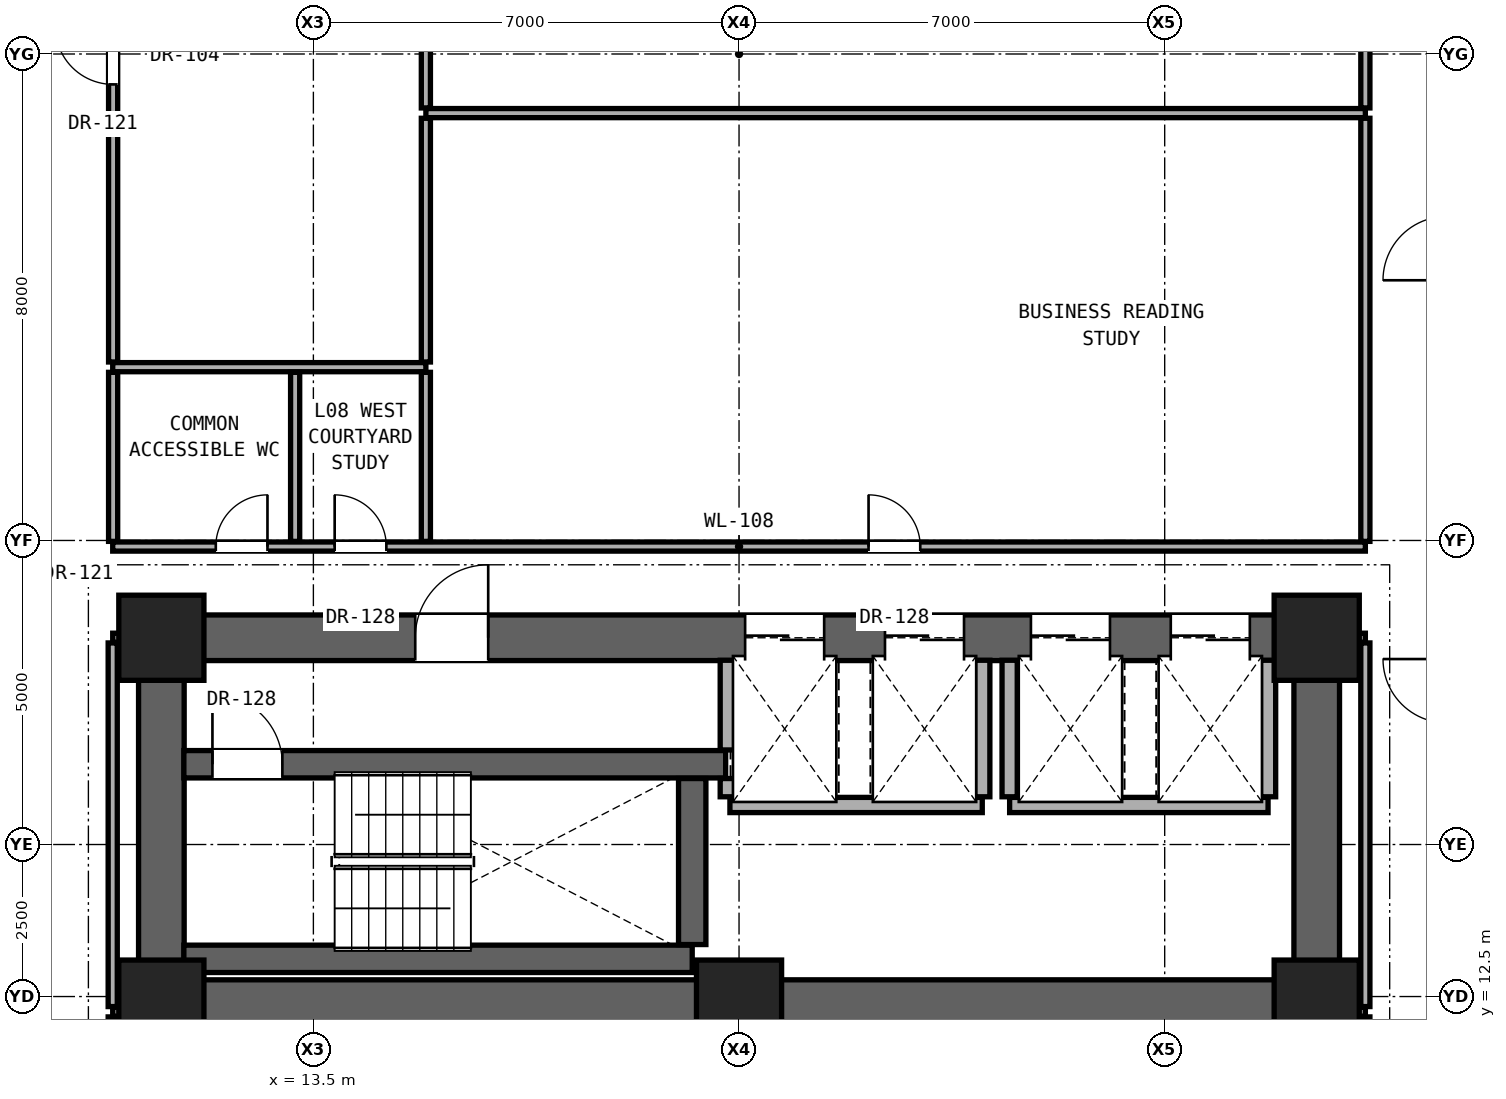
"""IFC4 building model, lengths in metres.
Left out: names, types, materials, properties, quantities, classifications, styles, units other than length and angle.
Written with IfcOpenShell. Run it as: python <this file> out.ifc"""

import sys

from ifc_helpers import new_model, si_unit, direction, frame, frame_2d, origin, origin_2d, place, context, subcontext, project, spatial, rectangle, extrude, element, fill, save


model = new_model("IFC4")
c1 = context("Model", 3, precision=1e-05, world=origin(), true_north=direction((0.0, 1.0)))
c2 = subcontext(c1, "Body", "Model", "MODEL_VIEW")
j1 = project(units=[si_unit("LENGTHUNIT", "METRE"), si_unit("PLANEANGLEUNIT", "RADIAN")], contexts=[c1])
p1 = place(None, origin())
s1 = spatial("IfcSite", under=j1, at=p1, CompositionType="ELEMENT")
p2 = place(p1, origin())
s2 = spatial("IfcBuilding", under=s1, at=p2, CompositionType="ELEMENT")
p3 = place(p2, frame((0.0, 0.0, 32.3)))
s3 = spatial("IfcBuildingStorey", under=s2, at=p3, CompositionType="ELEMENT", Elevation=32.3)
for number, where, z_axis, x_axis in (
    (1, (11.0, 12.4, 0.0), (0.0, 0.0, 1.0), (1.0, 0.0, 0.0)),
    (2, (20.5, 12.4, 0.0), (0.0, 0.0, 1.0), (1.0, 0.0, 0.0)),
    (3, (30.0, 12.4, 0.0), (0.0, 0.0, 1.0), (1.0, 0.0, 0.0)),
    (4, (11.0, 18.4, 0.0), (0.0, 0.0, 1.0), (1.0, 0.0, 0.0)),
    (5, (30.0, 18.4, 0.0), (0.0, 0.0, 1.0), (1.0, 0.0, 0.0)),
):
    element("IfcColumn", number, at=place(p3, frame(where, z_axis=z_axis, x_axis=x_axis)), inside=s3, PredefinedType="COLUMN", context=c2, shape_type="SweptSolid", body=[
        extrude(rectangle(XDim=1.4, YDim=1.4, at=origin_2d()), origin(), (0.0, 0.0, 1.0), 3.3),
    ])
p4 = place(p3, frame((11.0, 12.4, 0.0), z_axis=(0.0, 0.0, 1.0), x_axis=(1.0, 0.0, 0.0)))
e6 = element("IfcWall", 6, at=p4, inside=s3, PredefinedType="SHEAR", context=c2, shape_type="SweptSolid", body=[
    extrude(rectangle(XDim=19.0, YDim=0.75, at=frame_2d((9.5, 0.0))), origin(), (0.0, 0.0, 1.0), 3.06),
])
for number, where, z_axis, x_axis in (
    (7, (11.0, 12.4, 0.0), (0.0, 0.0, 1.0), (0.0, 1.0, 0.0)),
    (8, (30.0, 12.4, 0.0), (0.0, 0.0, 1.0), (0.0, 1.0, 0.0)),
):
    element("IfcWall", number, at=place(p3, frame(where, z_axis=z_axis, x_axis=x_axis)), inside=s3, PredefinedType="SHEAR", context=c2, shape_type="SweptSolid", body=[
        extrude(rectangle(XDim=6.0, YDim=0.75, at=frame_2d((3.0, 0.0))), origin(), (0.0, 0.0, 1.0), 3.06),
    ])
p5 = place(p3, frame((11.0, 18.4, 0.0), z_axis=(0.0, 0.0, 1.0), x_axis=(1.0, 0.0, 0.0)))
e9 = element("IfcWall", 9, at=p5, inside=s3, PredefinedType="SHEAR", context=c2, shape_type="SweptSolid", body=[
    extrude(rectangle(XDim=19.0, YDim=0.75, at=frame_2d((9.5, 0.0))), origin(), (0.0, 0.0, 1.0), 3.06),
])
p6 = place(p5, frame((4.175, 0.0, 0.0)))
e10 = element("IfcOpeningElement", 10, at=p6, cuts=e9, PredefinedType="OPENING", context=c2, shape_type="SweptSolid", body=[
    extrude(rectangle(XDim=1.2, YDim=2.25, at=frame_2d((0.6, 1.125))), frame((0.0, 0.385, 0.0), z_axis=(0.0, -1.0, 0.0), x_axis=(1.0, 0.0, 0.0)), (0.0, 0.0, 1.0), 0.77),
])
p7 = place(p5, frame((9.6, 0.0, 0.0)))
e11 = element("IfcOpeningElement", 11, at=p7, cuts=e9, PredefinedType="OPENING", context=c2, shape_type="SweptSolid", body=[
    extrude(rectangle(XDim=1.3, YDim=2.3, at=frame_2d((0.65, 1.15))), frame((0.0, 0.385, 0.0), z_axis=(0.0, -1.0, 0.0), x_axis=(1.0, 0.0, 0.0)), (0.0, 0.0, 1.0), 0.77),
])
p8 = place(p5, frame((11.9, 0.0, 0.0)))
e12 = element("IfcOpeningElement", 12, at=p8, cuts=e9, PredefinedType="OPENING", context=c2, shape_type="SweptSolid", body=[
    extrude(rectangle(XDim=1.3, YDim=2.3, at=frame_2d((0.65, 1.15))), frame((0.0, 0.385, 0.0), z_axis=(0.0, -1.0, 0.0), x_axis=(1.0, 0.0, 0.0)), (0.0, 0.0, 1.0), 0.77),
])
p9 = place(p5, frame((14.3, 0.0, 0.0)))
e13 = element("IfcOpeningElement", 13, at=p9, cuts=e9, PredefinedType="OPENING", context=c2, shape_type="SweptSolid", body=[
    extrude(rectangle(XDim=1.3, YDim=2.3, at=frame_2d((0.65, 1.15))), frame((0.0, 0.385, 0.0), z_axis=(0.0, -1.0, 0.0), x_axis=(1.0, 0.0, 0.0)), (0.0, 0.0, 1.0), 0.77),
])
p10 = place(p5, frame((16.6, 0.0, 0.0)))
e14 = element("IfcOpeningElement", 14, at=p10, cuts=e9, PredefinedType="OPENING", context=c2, shape_type="SweptSolid", body=[
    extrude(rectangle(XDim=1.3, YDim=2.3, at=frame_2d((0.65, 1.15))), frame((0.0, 0.385, 0.0), z_axis=(0.0, -1.0, 0.0), x_axis=(1.0, 0.0, 0.0)), (0.0, 0.0, 1.0), 0.77),
])
for number, where, z_axis, x_axis in (
    (15, (10.2, 12.25, 0.0), (0.0, 0.0, 1.0), (1.0, 0.0, 0.0)),
    (16, (30.37, 12.25, 0.0), (0.0, 0.0, 1.0), (1.0, 0.0, 0.0)),
):
    element("IfcWall", number, at=place(p3, frame(where, z_axis=z_axis, x_axis=x_axis)), inside=s3, PredefinedType="PARTITIONING", context=c2, shape_type="SweptSolid", body=[
        extrude(rectangle(XDim=0.43, YDim=0.15, at=frame_2d((0.215, 0.0))), origin(), (0.0, 0.0, 1.0), 3.06),
    ])
p11 = place(p3, frame((11.37, 13.12, 0.0), z_axis=(0.0, 0.0, 1.0), x_axis=(1.0, 0.0, 0.0)))
e17 = element("IfcWall", 17, at=p11, inside=s3, PredefinedType="SHEAR", context=c2, shape_type="SweptSolid", body=[
    extrude(rectangle(XDim=8.36, YDim=0.45, at=frame_2d((4.18, 0.0))), origin(), (0.0, 0.0, 1.0), 3.06),
])
p12 = place(p3, frame((20.35, 15.65, 0.0), z_axis=(0.0, 0.0, 1.0), x_axis=(1.0, 0.0, 0.0)))
e18 = element("IfcWall", 18, at=p12, inside=s3, PredefinedType="SOLIDWALL", context=c2, shape_type="SweptSolid", body=[
    extrude(rectangle(XDim=4.15, YDim=0.25, at=frame_2d((2.075, 0.0))), origin(), (0.0, 0.0, 1.0), 3.06),
])
p13 = place(p3, frame((24.95, 15.65, 0.0), z_axis=(0.0, 0.0, 1.0), x_axis=(1.0, 0.0, 0.0)))
e19 = element("IfcWall", 19, at=p13, inside=s3, PredefinedType="SOLIDWALL", context=c2, shape_type="SweptSolid", body=[
    extrude(rectangle(XDim=4.25, YDim=0.25, at=frame_2d((2.125, 0.0))), origin(), (0.0, 0.0, 1.0), 3.06),
])
p14 = place(p3, frame((11.37, 16.32, 0.0), z_axis=(0.0, 0.0, 1.0), x_axis=(1.0, 0.0, 0.0)))
e20 = element("IfcWall", 20, at=p14, inside=s3, PredefinedType="SHEAR", context=c2, shape_type="SweptSolid", body=[
    extrude(rectangle(XDim=8.91, YDim=0.45, at=frame_2d((4.455, 0.0))), origin(), (0.0, 0.0, 1.0), 3.06),
])
p15 = place(p14, frame((0.47, 0.0, 0.0)))
e21 = element("IfcOpeningElement", 21, at=p15, cuts=e20, PredefinedType="OPENING", context=c2, shape_type="SweptSolid", body=[
    extrude(rectangle(XDim=1.15, YDim=2.2, at=frame_2d((0.575, 1.1))), frame((0.0, 0.235, 0.0), z_axis=(0.0, -1.0, 0.0), x_axis=(1.0, 0.0, 0.0)), (0.0, 0.0, 1.0), 0.47),
])
for number, where, z_axis, x_axis in (
    (22, (10.2, 18.4, 0.0), (0.0, 0.0, 1.0), (1.0, 0.0, 0.0)),
    (23, (30.37, 18.4, 0.0), (0.0, 0.0, 1.0), (1.0, 0.0, 0.0)),
):
    element("IfcWall", number, at=place(p3, frame(where, z_axis=z_axis, x_axis=x_axis)), inside=s3, PredefinedType="PARTITIONING", context=c2, shape_type="SweptSolid", body=[
        extrude(rectangle(XDim=0.43, YDim=0.15, at=frame_2d((0.215, 0.0))), origin(), (0.0, 0.0, 1.0), 2.436),
    ])
p16 = place(p3, frame((10.2, 19.9, 0.0), z_axis=(0.0, 0.0, 1.0), x_axis=(1.0, 0.0, 0.0)))
e24 = element("IfcWall", 24, at=p16, inside=s3, PredefinedType="PARTITIONING", context=c2, shape_type="SweptSolid", body=[
    extrude(rectangle(XDim=20.6, YDim=0.15, at=frame_2d((10.3, 0.0))), origin(), (0.0, 0.0, 1.0), 2.104),
])
p17 = place(p16, frame((1.695, 0.0, 0.0)))
e25 = element("IfcOpeningElement", 25, at=p17, cuts=e24, PredefinedType="OPENING", context=c2, shape_type="SweptSolid", body=[
    extrude(rectangle(XDim=0.85, YDim=2.01, at=frame_2d((0.425, 1.005))), frame((0.0, 0.085, 0.0), z_axis=(0.0, -1.0, 0.0), x_axis=(1.0, 0.0, 0.0)), (0.0, 0.0, 1.0), 0.17),
])
p18 = place(p16, frame((3.65, 0.0, 0.0)))
e26 = element("IfcOpeningElement", 26, at=p18, cuts=e24, PredefinedType="OPENING", context=c2, shape_type="SweptSolid", body=[
    extrude(rectangle(XDim=0.85, YDim=2.01, at=frame_2d((0.425, 1.005))), frame((0.0, 0.085, 0.0), z_axis=(0.0, -1.0, 0.0), x_axis=(1.0, 0.0, 0.0)), (0.0, 0.0, 1.0), 0.17),
])
p19 = place(p16, frame((12.43, 0.0, 0.0)))
e27 = element("IfcOpeningElement", 27, at=p19, cuts=e24, PredefinedType="OPENING", context=c2, shape_type="SweptSolid", body=[
    extrude(rectangle(XDim=0.85, YDim=2.01, at=frame_2d((0.425, 1.005))), frame((0.0, 0.085, 0.0), z_axis=(0.0, -1.0, 0.0), x_axis=(1.0, 0.0, 0.0)), (0.0, 0.0, 1.0), 0.17),
])
p20 = place(p3, frame((10.2, 22.85, 0.0), z_axis=(0.0, 0.0, 1.0), x_axis=(1.0, 0.0, 0.0)))
e28 = element("IfcWall", 28, at=p20, inside=s3, PredefinedType="PARTITIONING", context=c2, shape_type="SweptSolid", body=[
    extrude(rectangle(XDim=5.15, YDim=0.15, at=frame_2d((2.575, 0.0))), origin(), (0.0, 0.0, 1.0), 2.104),
])
p21 = place(p3, frame((15.35, 27.028, 0.0), z_axis=(0.0, 0.0, 1.0), x_axis=(1.0, 0.0, 0.0)))
e29 = element("IfcWall", 29, at=p21, inside=s3, PredefinedType="PARTITIONING", context=c2, shape_type="SweptSolid", body=[
    extrude(rectangle(XDim=15.45, YDim=0.15, at=frame_2d((7.725, 0.0))), origin(), (0.0, 0.0, 1.0), 2.104),
])
p22 = place(p3, frame((10.2, 8.726, 0.0), z_axis=(0.0, 0.0, 1.0), x_axis=(0.0, 1.0, 0.0)))
e30 = element("IfcWall", 30, at=p22, inside=s3, PredefinedType="PARTITIONING", context=c2, shape_type="SweptSolid", body=[
    extrude(rectangle(XDim=3.439, YDim=0.15, at=frame_2d((1.719, 0.0))), origin(), (0.0, 0.0, 1.0), 3.06),
])
p23 = place(p22, frame((1.195, 0.0, 0.0)))
e31 = element("IfcOpeningElement", 31, at=p23, cuts=e30, PredefinedType="OPENING", context=c2, shape_type="SweptSolid", body=[
    extrude(rectangle(XDim=1.05, YDim=2.2, at=frame_2d((0.525, 1.1))), frame((0.0, 0.085, 0.0), z_axis=(0.0, -1.0, 0.0), x_axis=(1.0, 0.0, 0.0)), (0.0, 0.0, 1.0), 0.17),
])
p24 = place(p3, frame((10.2, 12.335, 0.0), z_axis=(0.0, 0.0, 1.0), x_axis=(0.0, 1.0, 0.0)))
e32 = element("IfcWall", 32, at=p24, inside=s3, PredefinedType="PARTITIONING", context=c2, shape_type="SweptSolid", body=[
    extrude(rectangle(XDim=5.98, YDim=0.15, at=frame_2d((2.99, 0.0))), origin(), (0.0, 0.0, 1.0), 2.436),
])
p25 = place(p3, frame((10.207, 19.985, 0.0), z_axis=(0.0, 0.0, 1.0), x_axis=(0.0, 1.0, 0.0)))
e33 = element("IfcWall", 33, at=p25, inside=s3, PredefinedType="PARTITIONING", context=c2, shape_type="SweptSolid", body=[
    extrude(rectangle(XDim=2.78, YDim=0.15, at=frame_2d((1.39, 0.0))), origin(), (0.0, 0.0, 1.0), 3.06),
])
p26 = place(p3, frame((10.207, 22.935, 0.0), z_axis=(0.0, 0.0, 1.0), x_axis=(0.0, 1.0, 0.0)))
e34 = element("IfcWall", 34, at=p26, inside=s3, PredefinedType="PARTITIONING", context=c2, shape_type="SweptSolid", body=[
    extrude(rectangle(XDim=10.08, YDim=0.15, at=frame_2d((5.04, 0.0))), origin(), (0.0, 0.0, 1.0), 2.279),
])
p27 = place(p26, frame((4.565, 0.0, 0.0)))
e35 = element("IfcOpeningElement", 35, at=p27, cuts=e34, PredefinedType="OPENING", context=c2, shape_type="SweptSolid", body=[
    extrude(rectangle(XDim=0.95, YDim=2.15, at=frame_2d((0.475, 1.075))), frame((0.0, 0.085, 0.0), z_axis=(0.0, -1.0, 0.0), x_axis=(1.0, 0.0, 0.0)), (0.0, 0.0, 1.0), 0.17),
])
for number, where, z_axis, x_axis in (
    (36, (13.2, 19.985, 0.0), (0.0, 0.0, 1.0), (0.0, 1.0, 0.0)),
    (37, (15.35, 19.985, 0.0), (0.0, 0.0, 1.0), (0.0, 1.0, 0.0)),
):
    element("IfcWall", number, at=place(p3, frame(where, z_axis=z_axis, x_axis=x_axis)), inside=s3, PredefinedType="PARTITIONING", context=c2, shape_type="SweptSolid", body=[
        extrude(rectangle(XDim=2.78, YDim=0.15, at=frame_2d((1.39, 0.0))), origin(), (0.0, 0.0, 1.0), 3.06),
    ])
p28 = place(p3, frame((15.35, 22.935, 0.0), z_axis=(0.0, 0.0, 1.0), x_axis=(0.0, 1.0, 0.0)))
e38 = element("IfcWall", 38, at=p28, inside=s3, PredefinedType="PARTITIONING", context=c2, shape_type="SweptSolid", body=[
    extrude(rectangle(XDim=4.008, YDim=0.15, at=frame_2d((2.004, 0.0))), origin(), (0.0, 0.0, 1.0), 2.104),
])
p29 = place(p3, frame((15.35, 27.113, 0.0), z_axis=(0.0, 0.0, 1.0), x_axis=(0.0, 1.0, 0.0)))
e39 = element("IfcWall", 39, at=p29, inside=s3, PredefinedType="PARTITIONING", context=c2, shape_type="SweptSolid", body=[
    extrude(rectangle(XDim=5.902, YDim=0.15, at=frame_2d((2.951, 0.0))), origin(), (0.0, 0.0, 1.0), 2.104),
])
p30 = place(p3, frame((19.73, 13.355, 0.0), z_axis=(0.0, 0.0, 1.0), x_axis=(0.0, 1.0, 0.0)))
e40 = element("IfcWall", 40, at=p30, inside=s3, PredefinedType="SHEAR", context=c2, shape_type="SweptSolid", body=[
    extrude(rectangle(XDim=2.73, YDim=0.45, at=frame_2d((1.365, 0.0))), origin(), (0.0, 0.0, 1.0), 3.06),
])
p31 = place(p3, frame((20.315, 15.785, 0.0), z_axis=(0.0, 0.0, 1.0), x_axis=(0.0, 1.0, 0.0)))
e41 = element("IfcWall", 41, at=p31, inside=s3, PredefinedType="SOLIDWALL", context=c2, shape_type="SweptSolid", body=[
    extrude(rectangle(XDim=0.3, YDim=0.25, at=frame_2d((0.15, 0.0))), origin(), (0.0, 0.0, 1.0), 3.06),
])
p32 = place(p3, frame((20.315, 16.555, 0.0), z_axis=(0.0, 0.0, 1.0), x_axis=(0.0, 1.0, 0.0)))
e42 = element("IfcWall", 42, at=p32, inside=s3, PredefinedType="SOLIDWALL", context=c2, shape_type="SweptSolid", body=[
    extrude(rectangle(XDim=1.475, YDim=0.25, at=frame_2d((0.738, 0.0))), origin(), (0.0, 0.0, 1.0), 3.06),
])
for number, where, z_axis, x_axis in (
    (43, (24.5, 15.785, 0.0), (0.0, 0.0, 1.0), (0.0, 1.0, 0.0)),
    (44, (24.95, 15.785, 0.0), (0.0, 0.0, 1.0), (0.0, 1.0, 0.0)),
    (45, (29.2, 15.785, 0.0), (0.0, 0.0, 1.0), (0.0, 1.0, 0.0)),
):
    element("IfcWall", number, at=place(p3, frame(where, z_axis=z_axis, x_axis=x_axis)), inside=s3, PredefinedType="SOLIDWALL", context=c2, shape_type="SweptSolid", body=[
        extrude(rectangle(XDim=2.245, YDim=0.25, at=frame_2d((1.123, 0.0))), origin(), (0.0, 0.0, 1.0), 3.06),
    ])
p33 = place(p3, frame((30.8, 8.726, 0.0), z_axis=(0.0, 0.0, 1.0), x_axis=(0.0, 1.0, 0.0)))
e46 = element("IfcWall", 46, at=p33, inside=s3, PredefinedType="PARTITIONING", context=c2, shape_type="SweptSolid", body=[
    extrude(rectangle(XDim=3.439, YDim=0.15, at=frame_2d((1.719, 0.0))), origin(), (0.0, 0.0, 1.0), 3.06),
])
p34 = place(p33, frame((1.195, 0.0, 0.0)))
e47 = element("IfcOpeningElement", 47, at=p34, cuts=e46, PredefinedType="OPENING", context=c2, shape_type="SweptSolid", body=[
    extrude(rectangle(XDim=1.05, YDim=2.2, at=frame_2d((0.525, 1.1))), frame((0.0, 0.085, 0.0), z_axis=(0.0, -1.0, 0.0), x_axis=(1.0, 0.0, 0.0)), (0.0, 0.0, 1.0), 0.17),
])
p35 = place(p3, frame((30.8, 12.335, 0.0), z_axis=(0.0, 0.0, 1.0), x_axis=(0.0, 1.0, 0.0)))
e48 = element("IfcWall", 48, at=p35, inside=s3, PredefinedType="PARTITIONING", context=c2, shape_type="SweptSolid", body=[
    extrude(rectangle(XDim=5.98, YDim=0.15, at=frame_2d((2.99, 0.0))), origin(), (0.0, 0.0, 1.0), 2.436),
])
p36 = place(p3, frame((30.8, 19.985, 0.0), z_axis=(0.0, 0.0, 1.0), x_axis=(0.0, 1.0, 0.0)))
e49 = element("IfcWall", 49, at=p36, inside=s3, PredefinedType="PARTITIONING", context=c2, shape_type="SweptSolid", body=[
    extrude(rectangle(XDim=6.958, YDim=0.15, at=frame_2d((3.479, 0.0))), origin(), (0.0, 0.0, 1.0), 2.279),
])
p37 = place(p3, frame((30.8, 27.113, 0.0), z_axis=(0.0, 0.0, 1.0), x_axis=(0.0, 1.0, 0.0)))
e50 = element("IfcWall", 50, at=p37, inside=s3, PredefinedType="PARTITIONING", context=c2, shape_type="SweptSolid", body=[
    extrude(rectangle(XDim=5.902, YDim=0.15, at=frame_2d((2.951, 0.0))), origin(), (0.0, 0.0, 1.0), 2.279),
])
p38 = place(p6, origin())
e51 = element("IfcDoor", 51, at=p38, inside=s3, OperationType="SINGLE_SWING_RIGHT", PredefinedType="DOOR", context=c2, shape_type="SweptSolid", body=[
    extrude(rectangle(XDim=1.2, YDim=2.25, at=frame_2d((0.6, 1.125))), frame((0.0, 0.025, 0.0), z_axis=(0.0, -1.0, 0.0), x_axis=(1.0, 0.0, 0.0)), (0.0, 0.0, 1.0), 0.05),
])
fill(e10, e51)
p39 = place(p15, origin())
e52 = element("IfcDoor", 52, at=p39, inside=s3, OperationType="SINGLE_SWING_LEFT", PredefinedType="DOOR", context=c2, shape_type="SweptSolid", body=[
    extrude(rectangle(XDim=1.15, YDim=2.2, at=frame_2d((0.575, 1.1))), frame((0.0, 0.025, 0.0), z_axis=(0.0, -1.0, 0.0), x_axis=(1.0, 0.0, 0.0)), (0.0, 0.0, 1.0), 0.05),
])
fill(e21, e52)
p40 = place(p17, origin())
e53 = element("IfcDoor", 53, at=p40, inside=s3, OperationType="SINGLE_SWING_RIGHT", PredefinedType="DOOR", context=c2, shape_type="SweptSolid", body=[
    extrude(rectangle(XDim=0.85, YDim=2.01, at=frame_2d((0.425, 1.005))), frame((0.0, 0.025, 0.0), z_axis=(0.0, -1.0, 0.0), x_axis=(1.0, 0.0, 0.0)), (0.0, 0.0, 1.0), 0.05),
])
fill(e25, e53)
p41 = place(p18, origin())
e54 = element("IfcDoor", 54, at=p41, inside=s3, OperationType="SINGLE_SWING_LEFT", PredefinedType="DOOR", context=c2, shape_type="SweptSolid", body=[
    extrude(rectangle(XDim=0.85, YDim=2.01, at=frame_2d((0.425, 1.005))), frame((0.0, 0.025, 0.0), z_axis=(0.0, -1.0, 0.0), x_axis=(1.0, 0.0, 0.0)), (0.0, 0.0, 1.0), 0.05),
])
fill(e26, e54)
p42 = place(p27, origin())
e55 = element("IfcDoor", 55, at=p42, inside=s3, OperationType="SINGLE_SWING_RIGHT", PredefinedType="DOOR", context=c2, shape_type="SweptSolid", body=[
    extrude(rectangle(XDim=0.95, YDim=2.15, at=frame_2d((0.475, 1.075))), frame((0.0, 0.025, 0.0), z_axis=(0.0, -1.0, 0.0), x_axis=(1.0, 0.0, 0.0)), (0.0, 0.0, 1.0), 0.05),
])
fill(e35, e55)
p43 = place(p19, origin())
e56 = element("IfcDoor", 56, at=p43, inside=s3, OperationType="SINGLE_SWING_LEFT", PredefinedType="DOOR", context=c2, shape_type="SweptSolid", body=[
    extrude(rectangle(XDim=0.85, YDim=2.01, at=frame_2d((0.425, 1.005))), frame((0.0, 0.025, 0.0), z_axis=(0.0, -1.0, 0.0), x_axis=(1.0, 0.0, 0.0)), (0.0, 0.0, 1.0), 0.05),
])
fill(e27, e56)
p44 = place(p7, origin())
e57 = element("IfcDoor", 57, at=p44, inside=s3, OperationType="DOUBLE_DOOR_SLIDING", PredefinedType="DOOR", context=c2, shape_type="SweptSolid", body=[
    extrude(rectangle(XDim=1.3, YDim=2.3, at=frame_2d((0.65, 1.15))), frame((0.0, 0.025, 0.0), z_axis=(0.0, -1.0, 0.0), x_axis=(1.0, 0.0, 0.0)), (0.0, 0.0, 1.0), 0.05),
])
fill(e11, e57)
p45 = place(p8, origin())
e58 = element("IfcDoor", 58, at=p45, inside=s3, OperationType="DOUBLE_DOOR_SLIDING", PredefinedType="DOOR", context=c2, shape_type="SweptSolid", body=[
    extrude(rectangle(XDim=1.3, YDim=2.3, at=frame_2d((0.65, 1.15))), frame((0.0, 0.025, 0.0), z_axis=(0.0, -1.0, 0.0), x_axis=(1.0, 0.0, 0.0)), (0.0, 0.0, 1.0), 0.05),
])
fill(e12, e58)
p46 = place(p9, origin())
e59 = element("IfcDoor", 59, at=p46, inside=s3, OperationType="DOUBLE_DOOR_SLIDING", PredefinedType="DOOR", context=c2, shape_type="SweptSolid", body=[
    extrude(rectangle(XDim=1.3, YDim=2.3, at=frame_2d((0.65, 1.15))), frame((0.0, 0.025, 0.0), z_axis=(0.0, -1.0, 0.0), x_axis=(1.0, 0.0, 0.0)), (0.0, 0.0, 1.0), 0.05),
])
fill(e13, e59)
p47 = place(p10, origin())
e60 = element("IfcDoor", 60, at=p47, inside=s3, OperationType="DOUBLE_DOOR_SLIDING", PredefinedType="DOOR", context=c2, shape_type="SweptSolid", body=[
    extrude(rectangle(XDim=1.3, YDim=2.3, at=frame_2d((0.65, 1.15))), frame((0.0, 0.025, 0.0), z_axis=(0.0, -1.0, 0.0), x_axis=(1.0, 0.0, 0.0)), (0.0, 0.0, 1.0), 0.05),
])
fill(e14, e60)
save(model, sys.argv[1])
